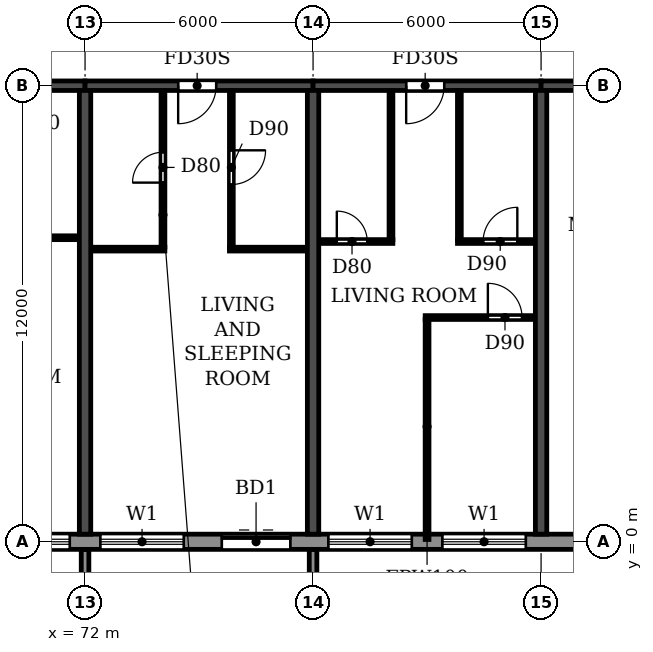
"""IFC4 building model, lengths in metres.
Left out: names, types, materials, properties, quantities, classifications, styles, units other than length and angle.
Written with IfcOpenShell. Run it as: python <this file> out.ifc"""

import sys

from ifc_helpers import new_model, si_unit, direction, frame, frame_2d, origin, place, context, subcontext, project, spatial, polyline, rectangle, outline, extrude, source, transform, mapped, element, fill, save


model = new_model("IFC4")
c1 = context("Model", 3, precision=1e-05, world=origin(), true_north=direction((0.0, 1.0)))
c2 = subcontext(c1, "Body", "Model", "MODEL_VIEW")
j1 = project(units=[si_unit("LENGTHUNIT", "METRE"), si_unit("PLANEANGLEUNIT", "RADIAN")], contexts=[c1])
p1 = place(None, origin())
s1 = spatial("IfcSite", under=j1, at=p1, CompositionType="ELEMENT")
p2 = place(p1, origin())
s2 = spatial("IfcBuilding", under=s1, at=p2, CompositionType="ELEMENT")
p3 = place(p2, frame((0.0, 0.0, 152.1)))
s3 = spatial("IfcBuildingStorey", under=s2, at=p3, CompositionType="ELEMENT", Elevation=152.1)
for number, where, z_axis, x_axis in (
    (1, (72.0, 0.2, 0.0), (0.0, 0.0, 1.0), (0.0, 1.0, 0.0)),
    (2, (78.0, 0.2, 0.0), (0.0, 0.0, 1.0), (0.0, 1.0, 0.0)),
    (3, (84.0, 0.2, 0.0), (0.0, 0.0, 1.0), (0.0, 1.0, 0.0)),
):
    element("IfcWall", number, at=place(p3, frame(where, z_axis=z_axis, x_axis=x_axis)), inside=s3, PredefinedType="SHEAR", context=c2, shape_type="SweptSolid", body=[
        extrude(rectangle(XDim=11.675, YDim=0.3, at=frame_2d((5.837, 0.0))), origin(), (0.0, 0.0, 1.0), 3.07),
    ])
p4 = place(p3, frame((66.0, 12.0, 0.0), z_axis=(0.0, 0.0, 1.0), x_axis=(1.0, 0.0, 0.0)))
e4 = element("IfcWall", 4, at=p4, inside=s3, PredefinedType="SHEAR", context=c2, shape_type="SweptSolid", body=[
    extrude(rectangle(XDim=6.0, YDim=0.25, at=frame_2d((3.0, 0.0))), origin(), (0.0, 0.0, 1.0), 2.47),
])
p5 = place(p4, frame((2.45, 0.0, 0.0)))
e5 = element("IfcOpeningElement", 5, at=p5, cuts=e4, PredefinedType="OPENING", context=c2, shape_type="SweptSolid", body=[
    extrude(rectangle(XDim=1.0, YDim=2.1, at=frame_2d((0.5, 1.05))), frame((0.0, 0.135, 0.0), z_axis=(0.0, -1.0, 0.0), x_axis=(1.0, 0.0, 0.0)), (0.0, 0.0, 1.0), 0.27),
])
p6 = place(p3, frame((72.0, 12.0, 0.0), z_axis=(0.0, 0.0, 1.0), x_axis=(1.0, 0.0, 0.0)))
e6 = element("IfcWall", 6, at=p6, inside=s3, PredefinedType="SHEAR", context=c2, shape_type="SweptSolid", body=[
    extrude(rectangle(XDim=6.0, YDim=0.25, at=frame_2d((3.0, 0.0))), origin(), (0.0, 0.0, 1.0), 2.47),
])
p7 = place(p6, frame((2.45, 0.0, 0.0)))
e7 = element("IfcOpeningElement", 7, at=p7, cuts=e6, PredefinedType="OPENING", context=c2, shape_type="SweptSolid", body=[
    extrude(rectangle(XDim=1.0, YDim=2.1, at=frame_2d((0.5, 1.05))), frame((0.0, 0.135, 0.0), z_axis=(0.0, -1.0, 0.0), x_axis=(1.0, 0.0, 0.0)), (0.0, 0.0, 1.0), 0.27),
])
p8 = place(p3, frame((78.0, 12.0, 0.0), z_axis=(0.0, 0.0, 1.0), x_axis=(1.0, 0.0, 0.0)))
e8 = element("IfcWall", 8, at=p8, inside=s3, PredefinedType="SHEAR", context=c2, shape_type="SweptSolid", body=[
    extrude(rectangle(XDim=6.0, YDim=0.25, at=frame_2d((3.0, 0.0))), origin(), (0.0, 0.0, 1.0), 2.47),
])
p9 = place(p8, frame((2.45, 0.0, 0.0)))
e9 = element("IfcOpeningElement", 9, at=p9, cuts=e8, PredefinedType="OPENING", context=c2, shape_type="SweptSolid", body=[
    extrude(rectangle(XDim=1.0, YDim=2.1, at=frame_2d((0.5, 1.05))), frame((0.0, 0.135, 0.0), z_axis=(0.0, -1.0, 0.0), x_axis=(1.0, 0.0, 0.0)), (0.0, 0.0, 1.0), 0.27),
])
p10 = place(p3, frame((84.0, 12.0, 0.0), z_axis=(0.0, 0.0, 1.0), x_axis=(1.0, 0.0, 0.0)))
e10 = element("IfcWall", 10, at=p10, inside=s3, PredefinedType="SHEAR", context=c2, shape_type="SweptSolid", body=[
    extrude(rectangle(XDim=5.8, YDim=0.25, at=frame_2d((2.9, 0.0))), origin(), (0.0, 0.0, 1.0), 2.47),
])
p11 = place(p10, frame((2.5, 0.0, 0.0)))
e11 = element("IfcOpeningElement", 11, at=p11, cuts=e10, PredefinedType="OPENING", context=c2, shape_type="SweptSolid", body=[
    extrude(rectangle(XDim=1.0, YDim=2.1, at=frame_2d((0.5, 1.05))), frame((0.0, 0.135, 0.0), z_axis=(0.0, -1.0, 0.0), x_axis=(1.0, 0.0, 0.0)), (0.0, 0.0, 1.0), 0.27),
])
p12 = place(p3, frame((16.683, 0.0, 0.0), z_axis=(0.0, 0.0, 1.0), x_axis=(1.0, 0.0, 0.0)))
e12 = element("IfcWall", 12, at=p12, inside=s3, PredefinedType="STANDARD", context=c2, shape_type="SweptSolid", body=[
    extrude(rectangle(XDim=68.634, YDim=0.4, at=frame_2d((34.317, 0.0))), origin(), (0.0, 0.0, 1.0), 3.07),
])
p13 = place(p12, frame((1.717, 0.0, 0.9)))
e13 = element("IfcOpeningElement", 13, at=p13, cuts=e12, PredefinedType="OPENING", context=c2, shape_type="SweptSolid", body=[
    extrude(rectangle(XDim=2.2, YDim=1.5, at=frame_2d((1.1, 0.75))), frame((0.0, 0.21, 0.0), z_axis=(0.0, -1.0, 0.0), x_axis=(1.0, 0.0, 0.0)), (0.0, 0.0, 1.0), 0.42),
])
p14 = place(p12, frame((4.717, 0.0, 0.9)))
e14 = element("IfcOpeningElement", 14, at=p14, cuts=e12, PredefinedType="OPENING", context=c2, shape_type="SweptSolid", body=[
    extrude(rectangle(XDim=2.2, YDim=1.5, at=frame_2d((1.1, 0.75))), frame((0.0, 0.21, 0.0), z_axis=(0.0, -1.0, 0.0), x_axis=(1.0, 0.0, 0.0)), (0.0, 0.0, 1.0), 0.42),
])
p15 = place(p12, frame((7.917, 0.0, 0.0)))
e15 = element("IfcOpeningElement", 15, at=p15, cuts=e12, PredefinedType="OPENING", context=c2, shape_type="SweptSolid", body=[
    extrude(rectangle(XDim=1.8, YDim=2.4, at=frame_2d((0.9, 1.2))), frame((0.0, 0.21, 0.0), z_axis=(0.0, -1.0, 0.0), x_axis=(1.0, 0.0, 0.0)), (0.0, 0.0, 1.0), 0.42),
])
p16 = place(p12, frame((10.717, 0.0, 0.9)))
e16 = element("IfcOpeningElement", 16, at=p16, cuts=e12, PredefinedType="OPENING", context=c2, shape_type="SweptSolid", body=[
    extrude(rectangle(XDim=2.2, YDim=1.5, at=frame_2d((1.1, 0.75))), frame((0.0, 0.21, 0.0), z_axis=(0.0, -1.0, 0.0), x_axis=(1.0, 0.0, 0.0)), (0.0, 0.0, 1.0), 0.42),
])
p17 = place(p12, frame((13.717, 0.0, 0.9)))
e17 = element("IfcOpeningElement", 17, at=p17, cuts=e12, PredefinedType="OPENING", context=c2, shape_type="SweptSolid", body=[
    extrude(rectangle(XDim=2.2, YDim=1.5, at=frame_2d((1.1, 0.75))), frame((0.0, 0.21, 0.0), z_axis=(0.0, -1.0, 0.0), x_axis=(1.0, 0.0, 0.0)), (0.0, 0.0, 1.0), 0.42),
])
p18 = place(p12, frame((16.717, 0.0, 0.9)))
e18 = element("IfcOpeningElement", 18, at=p18, cuts=e12, PredefinedType="OPENING", context=c2, shape_type="SweptSolid", body=[
    extrude(rectangle(XDim=2.2, YDim=1.5, at=frame_2d((1.1, 0.75))), frame((0.0, 0.21, 0.0), z_axis=(0.0, -1.0, 0.0), x_axis=(1.0, 0.0, 0.0)), (0.0, 0.0, 1.0), 0.42),
])
p19 = place(p12, frame((19.717, 0.0, 0.9)))
e19 = element("IfcOpeningElement", 19, at=p19, cuts=e12, PredefinedType="OPENING", context=c2, shape_type="SweptSolid", body=[
    extrude(rectangle(XDim=2.2, YDim=1.5, at=frame_2d((1.1, 0.75))), frame((0.0, 0.21, 0.0), z_axis=(0.0, -1.0, 0.0), x_axis=(1.0, 0.0, 0.0)), (0.0, 0.0, 1.0), 0.42),
])
p20 = place(p12, frame((22.917, 0.0, 0.0)))
e20 = element("IfcOpeningElement", 20, at=p20, cuts=e12, PredefinedType="OPENING", context=c2, shape_type="SweptSolid", body=[
    extrude(rectangle(XDim=1.8, YDim=2.4, at=frame_2d((0.9, 1.2))), frame((0.0, 0.21, 0.0), z_axis=(0.0, -1.0, 0.0), x_axis=(1.0, 0.0, 0.0)), (0.0, 0.0, 1.0), 0.42),
])
p21 = place(p12, frame((25.717, 0.0, 0.9)))
e21 = element("IfcOpeningElement", 21, at=p21, cuts=e12, PredefinedType="OPENING", context=c2, shape_type="SweptSolid", body=[
    extrude(rectangle(XDim=2.2, YDim=1.5, at=frame_2d((1.1, 0.75))), frame((0.0, 0.21, 0.0), z_axis=(0.0, -1.0, 0.0), x_axis=(1.0, 0.0, 0.0)), (0.0, 0.0, 1.0), 0.42),
])
p22 = place(p12, frame((28.717, 0.0, 0.9)))
e22 = element("IfcOpeningElement", 22, at=p22, cuts=e12, PredefinedType="OPENING", context=c2, shape_type="SweptSolid", body=[
    extrude(rectangle(XDim=2.2, YDim=1.5, at=frame_2d((1.1, 0.75))), frame((0.0, 0.21, 0.0), z_axis=(0.0, -1.0, 0.0), x_axis=(1.0, 0.0, 0.0)), (0.0, 0.0, 1.0), 0.42),
])
p23 = place(p12, frame((31.917, 0.0, 0.0)))
e23 = element("IfcOpeningElement", 23, at=p23, cuts=e12, PredefinedType="OPENING", context=c2, shape_type="SweptSolid", body=[
    extrude(rectangle(XDim=1.8, YDim=2.4, at=frame_2d((0.9, 1.2))), frame((0.0, 0.21, 0.0), z_axis=(0.0, -1.0, 0.0), x_axis=(1.0, 0.0, 0.0)), (0.0, 0.0, 1.0), 0.42),
])
p24 = place(p12, frame((34.717, 0.0, 0.9)))
e24 = element("IfcOpeningElement", 24, at=p24, cuts=e12, PredefinedType="OPENING", context=c2, shape_type="SweptSolid", body=[
    extrude(rectangle(XDim=2.2, YDim=1.5, at=frame_2d((1.1, 0.75))), frame((0.0, 0.21, 0.0), z_axis=(0.0, -1.0, 0.0), x_axis=(1.0, 0.0, 0.0)), (0.0, 0.0, 1.0), 0.42),
])
p25 = place(p12, frame((37.717, 0.0, 0.9)))
e25 = element("IfcOpeningElement", 25, at=p25, cuts=e12, PredefinedType="OPENING", context=c2, shape_type="SweptSolid", body=[
    extrude(rectangle(XDim=2.2, YDim=1.5, at=frame_2d((1.1, 0.75))), frame((0.0, 0.21, 0.0), z_axis=(0.0, -1.0, 0.0), x_axis=(1.0, 0.0, 0.0)), (0.0, 0.0, 1.0), 0.42),
])
p26 = place(p12, frame((40.717, 0.0, 0.9)))
e26 = element("IfcOpeningElement", 26, at=p26, cuts=e12, PredefinedType="OPENING", context=c2, shape_type="SweptSolid", body=[
    extrude(rectangle(XDim=2.2, YDim=1.5, at=frame_2d((1.1, 0.75))), frame((0.0, 0.21, 0.0), z_axis=(0.0, -1.0, 0.0), x_axis=(1.0, 0.0, 0.0)), (0.0, 0.0, 1.0), 0.42),
])
p27 = place(p12, frame((43.717, 0.0, 0.9)))
e27 = element("IfcOpeningElement", 27, at=p27, cuts=e12, PredefinedType="OPENING", context=c2, shape_type="SweptSolid", body=[
    extrude(rectangle(XDim=2.2, YDim=1.5, at=frame_2d((1.1, 0.75))), frame((0.0, 0.21, 0.0), z_axis=(0.0, -1.0, 0.0), x_axis=(1.0, 0.0, 0.0)), (0.0, 0.0, 1.0), 0.42),
])
p28 = place(p12, frame((46.917, 0.0, 0.0)))
e28 = element("IfcOpeningElement", 28, at=p28, cuts=e12, PredefinedType="OPENING", context=c2, shape_type="SweptSolid", body=[
    extrude(rectangle(XDim=1.8, YDim=2.4, at=frame_2d((0.9, 1.2))), frame((0.0, 0.21, 0.0), z_axis=(0.0, -1.0, 0.0), x_axis=(1.0, 0.0, 0.0)), (0.0, 0.0, 1.0), 0.42),
])
p29 = place(p12, frame((49.717, 0.0, 0.9)))
e29 = element("IfcOpeningElement", 29, at=p29, cuts=e12, PredefinedType="OPENING", context=c2, shape_type="SweptSolid", body=[
    extrude(rectangle(XDim=2.2, YDim=1.5, at=frame_2d((1.1, 0.75))), frame((0.0, 0.21, 0.0), z_axis=(0.0, -1.0, 0.0), x_axis=(1.0, 0.0, 0.0)), (0.0, 0.0, 1.0), 0.42),
])
p30 = place(p12, frame((52.717, 0.0, 0.9)))
e30 = element("IfcOpeningElement", 30, at=p30, cuts=e12, PredefinedType="OPENING", context=c2, shape_type="SweptSolid", body=[
    extrude(rectangle(XDim=2.2, YDim=1.5, at=frame_2d((1.1, 0.75))), frame((0.0, 0.21, 0.0), z_axis=(0.0, -1.0, 0.0), x_axis=(1.0, 0.0, 0.0)), (0.0, 0.0, 1.0), 0.42),
])
p31 = place(p12, frame((55.717, 0.0, 0.9)))
e31 = element("IfcOpeningElement", 31, at=p31, cuts=e12, PredefinedType="OPENING", context=c2, shape_type="SweptSolid", body=[
    extrude(rectangle(XDim=2.2, YDim=1.5, at=frame_2d((1.1, 0.75))), frame((0.0, 0.21, 0.0), z_axis=(0.0, -1.0, 0.0), x_axis=(1.0, 0.0, 0.0)), (0.0, 0.0, 1.0), 0.42),
])
p32 = place(p12, frame((58.917, 0.0, 0.0)))
e32 = element("IfcOpeningElement", 32, at=p32, cuts=e12, PredefinedType="OPENING", context=c2, shape_type="SweptSolid", body=[
    extrude(rectangle(XDim=1.8, YDim=2.4, at=frame_2d((0.9, 1.2))), frame((0.0, 0.21, 0.0), z_axis=(0.0, -1.0, 0.0), x_axis=(1.0, 0.0, 0.0)), (0.0, 0.0, 1.0), 0.42),
])
p33 = place(p12, frame((61.717, 0.0, 0.9)))
e33 = element("IfcOpeningElement", 33, at=p33, cuts=e12, PredefinedType="OPENING", context=c2, shape_type="SweptSolid", body=[
    extrude(rectangle(XDim=2.2, YDim=1.5, at=frame_2d((1.1, 0.75))), frame((0.0, 0.21, 0.0), z_axis=(0.0, -1.0, 0.0), x_axis=(1.0, 0.0, 0.0)), (0.0, 0.0, 1.0), 0.42),
])
p34 = place(p12, frame((64.717, 0.0, 0.9)))
e34 = element("IfcOpeningElement", 34, at=p34, cuts=e12, PredefinedType="OPENING", context=c2, shape_type="SweptSolid", body=[
    extrude(rectangle(XDim=2.2, YDim=1.5, at=frame_2d((1.1, 0.75))), frame((0.0, 0.21, 0.0), z_axis=(0.0, -1.0, 0.0), x_axis=(1.0, 0.0, 0.0)), (0.0, 0.0, 1.0), 0.42),
])
m1 = source(origin(), c2, "Body", "SweptSolid", [
    extrude(outline(polyline([(0.0, 0.0), (0.2, 0.0), (0.2, 1.65), (0.0, 1.65), (0.0, 0.0)])), origin(), (0.0, 0.0, 1.0), 3.1),
])
for number, where in (
    (35, (71.9, -1.85, 0.0)),
    (36, (77.9, -1.85, 0.0)),
):
    element("IfcWall", number, at=place(p3, frame(where)), inside=s3, PredefinedType="STANDARD", context=c2, shape_type="MappedRepresentation", body=[
        mapped(m1, transform((0.0, 0.0, 0.0))),
    ])
p35 = place(p3, frame((80.95, 5.9, 0.0), z_axis=(0.0, 0.0, 1.0), x_axis=(1.0, 0.0, 0.0)))
e37 = element("IfcWall", 37, at=p35, inside=s3, PredefinedType="PARTITIONING", context=c2, shape_type="SweptSolid", body=[
    extrude(rectangle(XDim=2.89, YDim=0.1, at=frame_2d((1.445, 0.0))), origin(), (0.0, 0.0, 1.0), 3.07),
])
p36 = place(p35, frame((1.65, 0.0, 0.0)))
e38 = element("IfcOpeningElement", 38, at=p36, cuts=e37, PredefinedType="OPENING", context=c2, shape_type="SweptSolid", body=[
    extrude(rectangle(XDim=0.9, YDim=2.1, at=frame_2d((0.45, 1.05))), frame((0.0, 0.06, 0.0), z_axis=(0.0, -1.0, 0.0), x_axis=(1.0, 0.0, 0.0)), (0.0, 0.0, 1.0), 0.12),
])
p37 = place(p3, frame((72.16, 7.7, 0.0), z_axis=(0.0, 0.0, 1.0), x_axis=(1.0, 0.0, 0.0)))
e39 = element("IfcWall", 39, at=p37, inside=s3, PredefinedType="PARTITIONING", context=c2, shape_type="SweptSolid", body=[
    extrude(rectangle(XDim=1.94, YDim=0.1, at=frame_2d((0.97, 0.0))), origin(), (0.0, 0.0, 1.0), 3.07),
])
p38 = place(p3, frame((75.8, 7.7, 0.0), z_axis=(0.0, 0.0, 1.0), x_axis=(1.0, 0.0, 0.0)))
e40 = element("IfcWall", 40, at=p38, inside=s3, PredefinedType="PARTITIONING", context=c2, shape_type="SweptSolid", body=[
    extrude(rectangle(XDim=2.04, YDim=0.1, at=frame_2d((1.02, 0.0))), origin(), (0.0, 0.0, 1.0), 3.07),
])
p39 = place(p3, frame((78.16, 7.9, 0.0), z_axis=(0.0, 0.0, 1.0), x_axis=(1.0, 0.0, 0.0)))
e41 = element("IfcWall", 41, at=p39, inside=s3, PredefinedType="PARTITIONING", context=c2, shape_type="SweptSolid", body=[
    extrude(rectangle(XDim=1.94, YDim=0.1, at=frame_2d((0.97, 0.0))), origin(), (0.0, 0.0, 1.0), 3.07),
])
p40 = place(p39, frame((0.465, 0.0, 0.0)))
e42 = element("IfcOpeningElement", 42, at=p40, cuts=e41, PredefinedType="OPENING", context=c2, shape_type="SweptSolid", body=[
    extrude(rectangle(XDim=0.8, YDim=2.1, at=frame_2d((0.4, 1.05))), frame((0.0, 0.06, 0.0), z_axis=(0.0, -1.0, 0.0), x_axis=(1.0, 0.0, 0.0)), (0.0, 0.0, 1.0), 0.12),
])
p41 = place(p3, frame((81.8, 7.9, 0.0), z_axis=(0.0, 0.0, 1.0), x_axis=(1.0, 0.0, 0.0)))
e43 = element("IfcWall", 43, at=p41, inside=s3, PredefinedType="PARTITIONING", context=c2, shape_type="SweptSolid", body=[
    extrude(rectangle(XDim=2.04, YDim=0.1, at=frame_2d((1.02, 0.0))), origin(), (0.0, 0.0, 1.0), 3.07),
])
p42 = place(p41, frame((0.675, 0.0, 0.0)))
e44 = element("IfcOpeningElement", 44, at=p42, cuts=e43, PredefinedType="OPENING", context=c2, shape_type="SweptSolid", body=[
    extrude(rectangle(XDim=0.9, YDim=2.1, at=frame_2d((0.45, 1.05))), frame((0.0, 0.06, 0.0), z_axis=(0.0, -1.0, 0.0), x_axis=(1.0, 0.0, 0.0)), (0.0, 0.0, 1.0), 0.12),
])
p43 = place(p3, frame((69.8, 8.0, 0.0), z_axis=(0.0, 0.0, 1.0), x_axis=(1.0, 0.0, 0.0)))
e45 = element("IfcWall", 45, at=p43, inside=s3, PredefinedType="PARTITIONING", context=c2, shape_type="SweptSolid", body=[
    extrude(rectangle(XDim=2.04, YDim=0.1, at=frame_2d((1.02, 0.0))), origin(), (0.0, 0.0, 1.0), 3.07),
])
p44 = place(p3, frame((74.05, 7.75, 0.0), z_axis=(0.0, 0.0, 1.0), x_axis=(0.0, 1.0, 0.0)))
e46 = element("IfcWall", 46, at=p44, inside=s3, PredefinedType="PARTITIONING", context=c2, shape_type="SweptSolid", body=[
    extrude(rectangle(XDim=4.115, YDim=0.1, at=frame_2d((2.058, 0.0))), origin(), (0.0, 0.0, 1.0), 3.07),
])
p45 = place(p44, frame((1.7, 0.0, 0.0)))
e47 = element("IfcOpeningElement", 47, at=p45, cuts=e46, PredefinedType="OPENING", context=c2, shape_type="SweptSolid", body=[
    extrude(rectangle(XDim=0.8, YDim=2.1, at=frame_2d((0.4, 1.05))), frame((0.0, 0.06, 0.0), z_axis=(0.0, -1.0, 0.0), x_axis=(1.0, 0.0, 0.0)), (0.0, 0.0, 1.0), 0.12),
])
p46 = place(p3, frame((75.85, 7.75, 0.0), z_axis=(0.0, 0.0, 1.0), x_axis=(0.0, 1.0, 0.0)))
e48 = element("IfcWall", 48, at=p46, inside=s3, PredefinedType="PARTITIONING", context=c2, shape_type="SweptSolid", body=[
    extrude(rectangle(XDim=4.115, YDim=0.1, at=frame_2d((2.058, 0.0))), origin(), (0.0, 0.0, 1.0), 3.07),
])
p47 = place(p46, frame((1.65, 0.0, 0.0)))
e49 = element("IfcOpeningElement", 49, at=p47, cuts=e48, PredefinedType="OPENING", context=c2, shape_type="SweptSolid", body=[
    extrude(rectangle(XDim=0.9, YDim=2.1, at=frame_2d((0.45, 1.05))), frame((0.0, 0.06, 0.0), z_axis=(0.0, -1.0, 0.0), x_axis=(1.0, 0.0, 0.0)), (0.0, 0.0, 1.0), 0.12),
])
p48 = place(p3, frame((80.05, 7.95, 0.0), z_axis=(0.0, 0.0, 1.0), x_axis=(0.0, 1.0, 0.0)))
e50 = element("IfcWall", 50, at=p48, inside=s3, PredefinedType="PARTITIONING", context=c2, shape_type="SweptSolid", body=[
    extrude(rectangle(XDim=3.915, YDim=0.1, at=frame_2d((1.958, 0.0))), origin(), (0.0, 0.0, 1.0), 3.07),
])
p49 = place(p3, frame((81.0, 0.06, 0.0), z_axis=(0.0, 0.0, 1.0), x_axis=(0.0, 1.0, 0.0)))
e51 = element("IfcWall", 51, at=p49, inside=s3, PredefinedType="PARTITIONING", context=c2, shape_type="SweptSolid", body=[
    extrude(rectangle(XDim=5.79, YDim=0.1, at=frame_2d((2.895, 0.0))), origin(), (0.0, 0.0, 1.0), 3.07),
])
p50 = place(p3, frame((81.85, 7.95, 0.0), z_axis=(0.0, 0.0, 1.0), x_axis=(0.0, 1.0, 0.0)))
e52 = element("IfcWall", 52, at=p50, inside=s3, PredefinedType="PARTITIONING", context=c2, shape_type="SweptSolid", body=[
    extrude(rectangle(XDim=3.915, YDim=0.1, at=frame_2d((1.958, 0.0))), origin(), (0.0, 0.0, 1.0), 3.07),
])
p51 = place(p30, origin())
e53 = element("IfcWindow", 53, at=p51, inside=s3, PartitioningType="DOUBLE_PANEL_HORIZONTAL", PredefinedType="WINDOW", context=c2, shape_type="SweptSolid", body=[
    extrude(rectangle(XDim=2.2, YDim=1.5, at=frame_2d((1.1, 0.75))), frame((0.0, 0.03, 0.0), z_axis=(0.0, -1.0, 0.0), x_axis=(1.0, 0.0, 0.0)), (0.0, 0.0, 1.0), 0.06),
])
fill(e30, e53)
p52 = place(p31, origin())
e54 = element("IfcWindow", 54, at=p52, inside=s3, PartitioningType="DOUBLE_PANEL_HORIZONTAL", PredefinedType="WINDOW", context=c2, shape_type="SweptSolid", body=[
    extrude(rectangle(XDim=2.2, YDim=1.5, at=frame_2d((1.1, 0.75))), frame((0.0, 0.03, 0.0), z_axis=(0.0, -1.0, 0.0), x_axis=(1.0, 0.0, 0.0)), (0.0, 0.0, 1.0), 0.06),
])
fill(e31, e54)
p53 = place(p32, origin())
e55 = element("IfcDoor", 55, at=p53, inside=s3, OperationType="DOUBLE_DOOR_SLIDING", PredefinedType="DOOR", context=c2, shape_type="SweptSolid", body=[
    extrude(rectangle(XDim=1.8, YDim=2.4, at=frame_2d((0.9, 1.2))), frame((0.0, 0.025, 0.0), z_axis=(0.0, -1.0, 0.0), x_axis=(1.0, 0.0, 0.0)), (0.0, 0.0, 1.0), 0.05),
])
fill(e32, e55)
p54 = place(p33, origin())
e56 = element("IfcWindow", 56, at=p54, inside=s3, PartitioningType="DOUBLE_PANEL_HORIZONTAL", PredefinedType="WINDOW", context=c2, shape_type="SweptSolid", body=[
    extrude(rectangle(XDim=2.2, YDim=1.5, at=frame_2d((1.1, 0.75))), frame((0.0, 0.03, 0.0), z_axis=(0.0, -1.0, 0.0), x_axis=(1.0, 0.0, 0.0)), (0.0, 0.0, 1.0), 0.06),
])
fill(e33, e56)
p55 = place(p34, origin())
e57 = element("IfcWindow", 57, at=p55, inside=s3, PartitioningType="DOUBLE_PANEL_HORIZONTAL", PredefinedType="WINDOW", context=c2, shape_type="SweptSolid", body=[
    extrude(rectangle(XDim=2.2, YDim=1.5, at=frame_2d((1.1, 0.75))), frame((0.0, 0.03, 0.0), z_axis=(0.0, -1.0, 0.0), x_axis=(1.0, 0.0, 0.0)), (0.0, 0.0, 1.0), 0.06),
])
fill(e34, e57)
p56 = place(p45, origin())
e58 = element("IfcDoor", 58, at=p56, inside=s3, OperationType="SINGLE_SWING_LEFT", PredefinedType="DOOR", context=c2, shape_type="SweptSolid", body=[
    extrude(rectangle(XDim=0.8, YDim=2.1, at=frame_2d((0.4, 1.05))), frame((0.0, 0.025, 0.0), z_axis=(0.0, -1.0, 0.0), x_axis=(1.0, 0.0, 0.0)), (0.0, 0.0, 1.0), 0.05),
])
fill(e47, e58)
p57 = place(p7, frame((1.0, 0.0, 0.0), z_axis=(0.0, 0.0, 1.0), x_axis=(-1.0, 0.0, 0.0)))
e59 = element("IfcDoor", 59, at=p57, inside=s3, OperationType="SINGLE_SWING_RIGHT", PredefinedType="DOOR", context=c2, shape_type="SweptSolid", body=[
    extrude(rectangle(XDim=1.0, YDim=2.1, at=frame_2d((0.5, 1.05))), frame((0.0, 0.025, 0.0), z_axis=(0.0, -1.0, 0.0), x_axis=(1.0, 0.0, 0.0)), (0.0, 0.0, 1.0), 0.05),
])
fill(e7, e59)
p58 = place(p47, frame((0.9, 0.0, 0.0), z_axis=(0.0, 0.0, 1.0), x_axis=(-1.0, 0.0, 0.0)))
e60 = element("IfcDoor", 60, at=p58, inside=s3, OperationType="SINGLE_SWING_LEFT", PredefinedType="DOOR", context=c2, shape_type="SweptSolid", body=[
    extrude(rectangle(XDim=0.9, YDim=2.1, at=frame_2d((0.45, 1.05))), frame((0.0, 0.025, 0.0), z_axis=(0.0, -1.0, 0.0), x_axis=(1.0, 0.0, 0.0)), (0.0, 0.0, 1.0), 0.05),
])
fill(e49, e60)
p59 = place(p40, origin())
e61 = element("IfcDoor", 61, at=p59, inside=s3, OperationType="SINGLE_SWING_LEFT", PredefinedType="DOOR", context=c2, shape_type="SweptSolid", body=[
    extrude(rectangle(XDim=0.8, YDim=2.1, at=frame_2d((0.4, 1.05))), frame((0.0, 0.025, 0.0), z_axis=(0.0, -1.0, 0.0), x_axis=(1.0, 0.0, 0.0)), (0.0, 0.0, 1.0), 0.05),
])
fill(e42, e61)
p60 = place(p9, frame((1.0, 0.0, 0.0), z_axis=(0.0, 0.0, 1.0), x_axis=(-1.0, 0.0, 0.0)))
e62 = element("IfcDoor", 62, at=p60, inside=s3, OperationType="SINGLE_SWING_RIGHT", PredefinedType="DOOR", context=c2, shape_type="SweptSolid", body=[
    extrude(rectangle(XDim=1.0, YDim=2.1, at=frame_2d((0.5, 1.05))), frame((0.0, 0.025, 0.0), z_axis=(0.0, -1.0, 0.0), x_axis=(1.0, 0.0, 0.0)), (0.0, 0.0, 1.0), 0.05),
])
fill(e9, e62)
p61 = place(p42, origin())
e63 = element("IfcDoor", 63, at=p61, inside=s3, OperationType="SINGLE_SWING_RIGHT", PredefinedType="DOOR", context=c2, shape_type="SweptSolid", body=[
    extrude(rectangle(XDim=0.9, YDim=2.1, at=frame_2d((0.45, 1.05))), frame((0.0, 0.025, 0.0), z_axis=(0.0, -1.0, 0.0), x_axis=(1.0, 0.0, 0.0)), (0.0, 0.0, 1.0), 0.05),
])
fill(e44, e63)
p62 = place(p36, origin())
e64 = element("IfcDoor", 64, at=p62, inside=s3, OperationType="SINGLE_SWING_LEFT", PredefinedType="DOOR", context=c2, shape_type="SweptSolid", body=[
    extrude(rectangle(XDim=0.9, YDim=2.1, at=frame_2d((0.45, 1.05))), frame((0.0, 0.025, 0.0), z_axis=(0.0, -1.0, 0.0), x_axis=(1.0, 0.0, 0.0)), (0.0, 0.0, 1.0), 0.05),
])
fill(e38, e64)
save(model, sys.argv[1])
